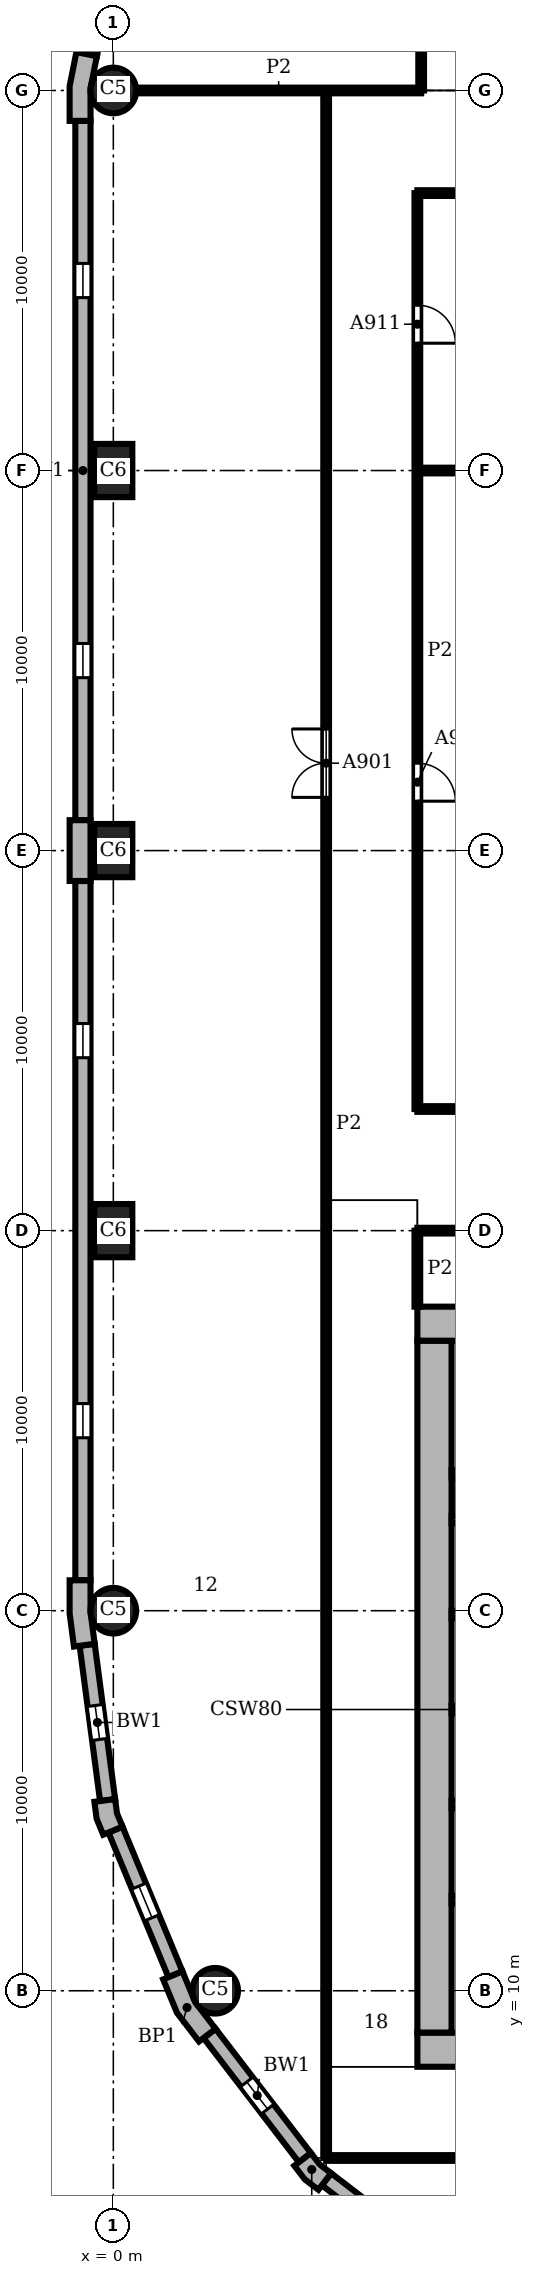
"""IFC4 building model, lengths in metres.
Left out: names, types, materials, properties, quantities, classifications, styles, units other than length and angle.
Written with IfcOpenShell. Run it as: python <this file> out.ifc"""

import sys

from ifc_helpers import new_model, si_unit, direction, frame, frame_2d, origin, origin_2d, place, context, subcontext, project, spatial, polyline, rectangle, circle, outline, extrude, element, fill, save


model = new_model("IFC4")
c1 = context("Model", 3, precision=1e-05, world=origin(), true_north=direction((0.0, 1.0)))
c2 = subcontext(c1, "Body", "Model", "MODEL_VIEW")
j1 = project(units=[si_unit("LENGTHUNIT", "METRE"), si_unit("PLANEANGLEUNIT", "RADIAN")], contexts=[c1])
p1 = place(None, origin())
s1 = spatial("IfcSite", under=j1, at=p1, CompositionType="ELEMENT")
p2 = place(p1, origin())
s2 = spatial("IfcBuilding", under=s1, at=p2, CompositionType="ELEMENT")
p3 = place(p2, frame((0.0, 0.0, 105.6)))
s3 = spatial("IfcBuildingStorey", under=s2, at=p3, CompositionType="ELEMENT", Elevation=105.6)
p4 = place(p3, frame((0.0, 60.0, 0.0), z_axis=(0.0, 0.0, 1.0), x_axis=(1.0, 0.0, 0.0)))
e1 = element("IfcColumn", 1, at=p4, inside=s3, PredefinedType="COLUMN", context=c2, shape_type="SweptSolid", body=[
    extrude(circle(Radius=0.6, at=origin_2d()), origin(), (0.0, 0.0, 1.0), 3.9),
])
for number, where, z_axis, x_axis in (
    (2, (0.0, 50.0, 0.0), (0.0, 0.0, 1.0), (0.0, 1.0, 0.0)),
    (3, (0.0, 40.0, 0.0), (0.0, 0.0, 1.0), (0.0, 1.0, 0.0)),
    (4, (0.0, 30.0, 0.0), (0.0, 0.0, 1.0), (0.0, 1.0, 0.0)),
):
    element("IfcColumn", number, at=place(p3, frame(where, z_axis=z_axis, x_axis=x_axis)), inside=s3, PredefinedType="COLUMN", context=c2, shape_type="SweptSolid", body=[
        extrude(rectangle(XDim=1.4, YDim=1.0, at=origin_2d()), origin(), (0.0, 0.0, 1.0), 3.9),
    ])
for number, where, z_axis, x_axis in (
    (5, (0.0, 20.0, 0.0), (0.0, 0.0, 1.0), (1.0, 0.0, 0.0)),
    (6, (2.679, 10.0, 0.0), (0.0, 0.0, 1.0), (1.0, 0.0, 0.0)),
):
    element("IfcColumn", number, at=place(p3, frame(where, z_axis=z_axis, x_axis=x_axis)), inside=s3, PredefinedType="COLUMN", context=c2, shape_type="SweptSolid", body=[
        extrude(circle(Radius=0.6, at=origin_2d()), origin(), (0.0, 0.0, 1.0), 3.9),
    ])
for number, where, z_axis, x_axis in (
    (7, (8.0, 8.45, 0.0), (0.0, 0.0, 1.0), (1.0, 0.0, 0.0)),
    (8, (28.0, 27.55, 0.0), (0.0, 0.0, 1.0), (-1.0, 0.0, 0.0)),
):
    element("IfcWall", number, at=place(p3, frame(where, z_axis=z_axis, x_axis=x_axis)), inside=s3, PredefinedType="SHEAR", context=c2, shape_type="SweptSolid", body=[
        extrude(rectangle(XDim=20.0, YDim=0.9, at=frame_2d((10.0, 0.0))), origin(), (0.0, 0.0, 1.0), 3.9),
    ])
p5 = place(p3, frame((8.45, 27.1, 0.0), z_axis=(0.0, 0.0, 1.0), x_axis=(0.0, -1.0, 0.0)))
e9 = element("IfcWall", 9, at=p5, inside=s3, PredefinedType="SHEAR", context=c2, shape_type="SweptSolid", body=[
    extrude(rectangle(XDim=18.2, YDim=0.9, at=frame_2d((9.1, 0.0))), origin(), (0.0, 0.0, 1.0), 3.9),
])
p6 = place(p3, origin())
e10 = element("IfcWall", 10, at=p6, inside=s3, PredefinedType="SOLIDWALL", context=c2, shape_type="SweptSolid", body=[
    extrude(outline(polyline([(-0.825, 60.98), (-0.972, 61.009), (-1.15, 60.113), (-1.15, 59.2), (-1.0, 59.2), (-0.6, 59.2), (-0.6, 60.059), (-0.432, 60.902), (-0.825, 60.98)])), origin(), (0.0, 0.0, 1.0), 3.9),
])
e11 = element("IfcWall", 11, at=p6, inside=s3, PredefinedType="SOLIDWALL", context=c2, shape_type="SweptSolid", body=[
    extrude(outline(polyline([(-1.0, 40.8), (-1.15, 40.8), (-1.15, 40.0), (-1.15, 39.2), (-1.0, 39.2), (-0.6, 39.2), (-0.6, 40.0), (-0.6, 40.8), (-1.0, 40.8)])), origin(), (0.0, 0.0, 1.0), 3.9),
])
e12 = element("IfcWall", 12, at=p6, inside=s3, PredefinedType="SOLIDWALL", context=c2, shape_type="SweptSolid", body=[
    extrude(outline(polyline([(-1.0, 20.8), (-1.15, 20.8), (-1.15, 19.925), (-1.036, 19.057), (-0.887, 19.076), (-0.49, 19.128), (-0.6, 19.961), (-0.6, 20.8), (-1.0, 20.8)])), origin(), (0.0, 0.0, 1.0), 3.9),
])
e13 = element("IfcWall", 13, at=p6, inside=s3, PredefinedType="SOLIDWALL", context=c2, shape_type="SweptSolid", body=[
    extrude(outline(polyline([(-0.349, 14.99), (-0.498, 14.971), (-0.439, 14.523), (-0.266, 14.106), (-0.128, 14.164), (0.242, 14.317), (0.097, 14.667), (0.047, 15.043), (-0.349, 14.99)])), origin(), (0.0, 0.0, 1.0), 3.9),
])
e14 = element("IfcWall", 14, at=p6, inside=s3, PredefinedType="SOLIDWALL", context=c2, shape_type="SweptSolid", body=[
    extrude(outline(polyline([(1.449, 10.356), (1.311, 10.299), (1.675, 9.42), (2.254, 8.665), (2.373, 8.757), (2.69, 9.0), (2.155, 9.698), (1.819, 10.51), (1.449, 10.356)])), origin(), (0.0, 0.0, 1.0), 3.9),
])
e15 = element("IfcWall", 15, at=p6, inside=s3, PredefinedType="SOLIDWALL", context=c2, shape_type="SweptSolid", body=[
    extrude(outline(polyline([(4.882, 5.487), (4.763, 5.396), (5.038, 5.038), (5.396, 4.763), (5.487, 4.882), (5.731, 5.199), (5.43, 5.43), (5.199, 5.731), (4.882, 5.487)])), origin(), (0.0, 0.0, 1.0), 3.9),
])
p7 = place(p3, frame((0.299, 65.602, 0.0), z_axis=(0.0, 0.0, 1.0), x_axis=(-0.195098533057, -0.98078364709, 0.0)))
e16 = element("IfcWall", 16, at=p7, inside=s3, PredefinedType="SOLIDWALL", context=c2, shape_type="SweptSolid", body=[
    extrude(rectangle(XDim=4.753, YDim=0.4, at=frame_2d((2.376, 0.0))), origin(), (0.0, 0.0, 1.0), 3.9),
])
p8 = place(p7, frame((0.226, 0.0, 0.9)))
e17 = element("IfcOpeningElement", 17, at=p8, cuts=e16, PredefinedType="OPENING", context=c2, shape_type="SweptSolid", body=[
    extrude(rectangle(XDim=4.3, YDim=2.35, at=frame_2d((2.15, 1.175))), frame((0.0, 0.21, 0.0), z_axis=(0.0, -1.0, 0.0), x_axis=(1.0, 0.0, 0.0)), (0.0, 0.0, 1.0), 0.42),
])
p9 = place(p3, frame((-0.8, 59.2, 0.0), z_axis=(0.0, 0.0, 1.0), x_axis=(0.0, -1.0, 0.0)))
e18 = element("IfcWall", 18, at=p9, inside=s3, PredefinedType="SOLIDWALL", context=c2, shape_type="SweptSolid", body=[
    extrude(rectangle(XDim=18.4, YDim=0.4, at=frame_2d((9.2, 0.0))), origin(), (0.0, 0.0, 1.0), 3.9),
])
p10 = place(p9, frame((3.75, 0.0, 0.9)))
e19 = element("IfcOpeningElement", 19, at=p10, cuts=e18, PredefinedType="OPENING", context=c2, shape_type="SweptSolid", body=[
    extrude(rectangle(XDim=0.9, YDim=2.35, at=frame_2d((0.45, 1.175))), frame((0.0, 0.21, 0.0), z_axis=(0.0, -1.0, 0.0), x_axis=(1.0, 0.0, 0.0)), (0.0, 0.0, 1.0), 0.42),
])
p11 = place(p9, frame((13.75, 0.0, 0.9)))
e20 = element("IfcOpeningElement", 20, at=p11, cuts=e18, PredefinedType="OPENING", context=c2, shape_type="SweptSolid", body=[
    extrude(rectangle(XDim=0.9, YDim=2.35, at=frame_2d((0.45, 1.175))), frame((0.0, 0.21, 0.0), z_axis=(0.0, -1.0, 0.0), x_axis=(1.0, 0.0, 0.0)), (0.0, 0.0, 1.0), 0.42),
])
p12 = place(p3, frame((-0.8, 39.2, 0.0), z_axis=(0.0, 0.0, 1.0), x_axis=(0.0, -1.0, 0.0)))
e21 = element("IfcWall", 21, at=p12, inside=s3, PredefinedType="SOLIDWALL", context=c2, shape_type="SweptSolid", body=[
    extrude(rectangle(XDim=18.4, YDim=0.4, at=frame_2d((9.2, 0.0))), origin(), (0.0, 0.0, 1.0), 3.9),
])
p13 = place(p12, frame((3.75, 0.0, 0.9)))
e22 = element("IfcOpeningElement", 22, at=p13, cuts=e21, PredefinedType="OPENING", context=c2, shape_type="SweptSolid", body=[
    extrude(rectangle(XDim=0.9, YDim=2.35, at=frame_2d((0.45, 1.175))), frame((0.0, 0.21, 0.0), z_axis=(0.0, -1.0, 0.0), x_axis=(1.0, 0.0, 0.0)), (0.0, 0.0, 1.0), 0.42),
])
p14 = place(p12, frame((13.75, 0.0, 0.9)))
e23 = element("IfcOpeningElement", 23, at=p14, cuts=e21, PredefinedType="OPENING", context=c2, shape_type="SweptSolid", body=[
    extrude(rectangle(XDim=0.9, YDim=2.35, at=frame_2d((0.45, 1.175))), frame((0.0, 0.21, 0.0), z_axis=(0.0, -1.0, 0.0), x_axis=(1.0, 0.0, 0.0)), (0.0, 0.0, 1.0), 0.42),
])
p15 = place(p3, frame((-0.689, 19.102, 0.0), z_axis=(0.0, 0.0, 1.0), x_axis=(0.130514280502, -0.991446429508, 0.0)))
e24 = element("IfcWall", 24, at=p15, inside=s3, PredefinedType="SOLIDWALL", context=c2, shape_type="SweptSolid", body=[
    extrude(rectangle(XDim=4.121, YDim=0.4, at=frame_2d((2.061, 0.0))), origin(), (0.0, 0.0, 1.0), 3.9),
])
p16 = place(p15, frame((1.611, 0.0, 0.9)))
e25 = element("IfcOpeningElement", 25, at=p16, cuts=e24, PredefinedType="OPENING", context=c2, shape_type="SweptSolid", body=[
    extrude(rectangle(XDim=0.9, YDim=2.35, at=frame_2d((0.45, 1.175))), frame((0.0, 0.21, 0.0), z_axis=(0.0, -1.0, 0.0), x_axis=(1.0, 0.0, 0.0)), (0.0, 0.0, 1.0), 0.42),
])
p17 = place(p3, frame((0.057, 14.24, 0.0), z_axis=(0.0, 0.0, 1.0), x_axis=(0.382721546029, -0.923863744394, 0.0)))
e26 = element("IfcWall", 26, at=p17, inside=s3, PredefinedType="SOLIDWALL", context=c2, shape_type="SweptSolid", body=[
    extrude(rectangle(XDim=4.121, YDim=0.4, at=frame_2d((2.061, 0.0))), origin(), (0.0, 0.0, 1.0), 3.9),
])
p18 = place(p17, frame((1.611, 0.0, 0.9)))
e27 = element("IfcOpeningElement", 27, at=p18, cuts=e26, PredefinedType="OPENING", context=c2, shape_type="SweptSolid", body=[
    extrude(rectangle(XDim=0.9, YDim=2.35, at=frame_2d((0.45, 1.175))), frame((0.0, 0.21, 0.0), z_axis=(0.0, -1.0, 0.0), x_axis=(1.0, 0.0, 0.0)), (0.0, 0.0, 1.0), 0.42),
])
p19 = place(p3, frame((2.532, 8.878, 0.0), z_axis=(0.0, 0.0, 1.0), x_axis=(0.608759824817, -0.793354571229, 0.0)))
e28 = element("IfcWall", 28, at=p19, inside=s3, PredefinedType="SOLIDWALL", context=c2, shape_type="SweptSolid", body=[
    extrude(rectangle(XDim=4.121, YDim=0.4, at=frame_2d((2.061, 0.0))), origin(), (0.0, 0.0, 1.0), 3.9),
])
p20 = place(p19, frame((1.611, 0.0, 0.9)))
e29 = element("IfcOpeningElement", 29, at=p20, cuts=e28, PredefinedType="OPENING", context=c2, shape_type="SweptSolid", body=[
    extrude(rectangle(XDim=0.9, YDim=2.35, at=frame_2d((0.45, 1.175))), frame((0.0, 0.21, 0.0), z_axis=(0.0, -1.0, 0.0), x_axis=(1.0, 0.0, 0.0)), (0.0, 0.0, 1.0), 0.42),
])
p21 = place(p3, frame((5.609, 5.041, 0.0), z_axis=(0.0, 0.0, 1.0), x_axis=(0.793354571229, -0.608759824817, 0.0)))
e30 = element("IfcWall", 30, at=p21, inside=s3, PredefinedType="SOLIDWALL", context=c2, shape_type="SweptSolid", body=[
    extrude(rectangle(XDim=4.121, YDim=0.4, at=frame_2d((2.061, 0.0))), origin(), (0.0, 0.0, 1.0), 3.9),
])
p22 = place(p21, frame((1.611, 0.0, 0.9)))
e31 = element("IfcOpeningElement", 31, at=p22, cuts=e30, PredefinedType="OPENING", context=c2, shape_type="SweptSolid", body=[
    extrude(rectangle(XDim=0.9, YDim=2.35, at=frame_2d((0.45, 1.175))), frame((0.0, 0.21, 0.0), z_axis=(0.0, -1.0, 0.0), x_axis=(1.0, 0.0, 0.0)), (0.0, 0.0, 1.0), 0.42),
])
p23 = place(p3, frame((8.9, 12.4, 0.0), z_axis=(0.0, 0.0, 1.0), x_axis=(1.0, 0.0, 0.0)))
e32 = element("IfcWall", 32, at=p23, inside=s3, PredefinedType="SHEAR", context=c2, shape_type="SweptSolid", body=[
    extrude(rectangle(XDim=4.9, YDim=0.2, at=frame_2d((2.45, 0.0))), origin(), (0.0, 0.0, 1.0), 3.58),
])
for number, where, z_axis, x_axis in (
    (33, (8.9, 14.9, 0.0), (0.0, 0.0, 1.0), (1.0, 0.0, 0.0)),
    (34, (8.9, 17.4, 0.0), (0.0, 0.0, 1.0), (1.0, 0.0, 0.0)),
    (35, (8.9, 19.9, 0.0), (0.0, 0.0, 1.0), (1.0, 0.0, 0.0)),
    (36, (8.9, 22.4, 0.0), (0.0, 0.0, 1.0), (1.0, 0.0, 0.0)),
):
    element("IfcWall", number, at=place(p3, frame(where, z_axis=z_axis, x_axis=x_axis)), inside=s3, PredefinedType="SHEAR", context=c2, shape_type="SweptSolid", body=[
        extrude(rectangle(XDim=2.8, YDim=0.2, at=frame_2d((1.4, 0.0))), origin(), (0.0, 0.0, 1.0), 3.58),
    ])
p24 = place(p3, frame((8.9, 23.6, 0.0), z_axis=(0.0, 0.0, 1.0), x_axis=(1.0, 0.0, 0.0)))
e37 = element("IfcWall", 37, at=p24, inside=s3, PredefinedType="SHEAR", context=c2, shape_type="SweptSolid", body=[
    extrude(rectangle(XDim=4.9, YDim=0.2, at=frame_2d((2.45, 0.0))), origin(), (0.0, 0.0, 1.0), 3.58),
])
p25 = place(p3, frame((5.6, 5.6, 0.0), z_axis=(0.0, 0.0, 1.0), x_axis=(0.0, 1.0, 0.0)))
e38 = element("IfcWall", 38, at=p25, inside=s3, PredefinedType="PARTITIONING", context=c2, shape_type="SweptSolid", body=[
    extrude(rectangle(XDim=54.4, YDim=0.15, at=frame_2d((27.2, 0.0))), origin(), (0.0, 0.0, 1.0), 3.58),
])
p26 = place(p25, frame((35.8, 0.0, 0.0)))
e39 = element("IfcOpeningElement", 39, at=p26, cuts=e38, PredefinedType="OPENING", context=c2, shape_type="SweptSolid", body=[
    extrude(rectangle(XDim=1.8, YDim=2.1, at=frame_2d((0.9, 1.05))), frame((0.0, 0.085, 0.0), z_axis=(0.0, -1.0, 0.0), x_axis=(1.0, 0.0, 0.0)), (0.0, 0.0, 1.0), 0.17),
])
p27 = place(p3, frame((8.0, 28.0, 0.0), z_axis=(0.0, 0.0, 1.0), x_axis=(0.0, 1.0, 0.0)))
e40 = element("IfcWall", 40, at=p27, inside=s3, PredefinedType="PARTITIONING", context=c2, shape_type="SweptSolid", body=[
    extrude(rectangle(XDim=2.0, YDim=0.15, at=frame_2d((1.0, 0.0))), origin(), (0.0, 0.0, 1.0), 3.58),
])
p28 = place(p3, frame((8.0, 33.2, 0.0), z_axis=(0.0, 0.0, 1.0), x_axis=(0.0, 1.0, 0.0)))
e41 = element("IfcWall", 41, at=p28, inside=s3, PredefinedType="PARTITIONING", context=c2, shape_type="SweptSolid", body=[
    extrude(rectangle(XDim=24.1, YDim=0.15, at=frame_2d((12.05, 0.0))), origin(), (0.0, 0.0, 1.0), 3.58),
])
p29 = place(p28, frame((8.1, 0.0, 0.0)))
e42 = element("IfcOpeningElement", 42, at=p29, cuts=e41, PredefinedType="OPENING", context=c2, shape_type="SweptSolid", body=[
    extrude(rectangle(XDim=1.0, YDim=2.1, at=frame_2d((0.5, 1.05))), frame((0.0, 0.085, 0.0), z_axis=(0.0, -1.0, 0.0), x_axis=(1.0, 0.0, 0.0)), (0.0, 0.0, 1.0), 0.17),
])
p30 = place(p28, frame((20.15, 0.0, 0.0)))
e43 = element("IfcOpeningElement", 43, at=p30, cuts=e41, PredefinedType="OPENING", context=c2, shape_type="SweptSolid", body=[
    extrude(rectangle(XDim=1.0, YDim=2.1, at=frame_2d((0.5, 1.05))), frame((0.0, 0.085, 0.0), z_axis=(0.0, -1.0, 0.0), x_axis=(1.0, 0.0, 0.0)), (0.0, 0.0, 1.0), 0.17),
])
p31 = place(p3, frame((8.1, 60.0, 0.0), z_axis=(0.0, 0.0, 1.0), x_axis=(0.0, 1.0, 0.0)))
e44 = element("IfcWall", 44, at=p31, inside=s3, PredefinedType="PARTITIONING", context=c2, shape_type="SweptSolid", body=[
    extrude(rectangle(XDim=6.4, YDim=0.15, at=frame_2d((3.2, 0.0))), origin(), (0.0, 0.0, 1.0), 3.58),
])
p32 = place(p31, frame((3.1, 0.0, 0.0)))
e45 = element("IfcOpeningElement", 45, at=p32, cuts=e44, PredefinedType="OPENING", context=c2, shape_type="SweptSolid", body=[
    extrude(rectangle(XDim=1.0, YDim=2.1, at=frame_2d((0.5, 1.05))), frame((0.0, 0.085, 0.0), z_axis=(0.0, -1.0, 0.0), x_axis=(1.0, 0.0, 0.0)), (0.0, 0.0, 1.0), 0.17),
])
p33 = place(p3, frame((5.6, 5.6, 0.0), z_axis=(0.0, 0.0, 1.0), x_axis=(1.0, 0.0, 0.0)))
e46 = element("IfcWall", 46, at=p33, inside=s3, PredefinedType="PARTITIONING", context=c2, shape_type="SweptSolid", body=[
    extrude(rectangle(XDim=25.4, YDim=0.15, at=frame_2d((12.7, 0.0))), origin(), (0.0, 0.0, 1.0), 3.58),
])
p34 = place(p33, frame((3.6, 0.0, 0.0)))
e47 = element("IfcOpeningElement", 47, at=p34, cuts=e46, PredefinedType="OPENING", context=c2, shape_type="SweptSolid", body=[
    extrude(rectangle(XDim=1.0, YDim=2.1, at=frame_2d((0.5, 1.05))), frame((0.0, 0.085, 0.0), z_axis=(0.0, -1.0, 0.0), x_axis=(1.0, 0.0, 0.0)), (0.0, 0.0, 1.0), 0.17),
])
p35 = place(p33, frame((11.75, 0.0, 0.0)))
e48 = element("IfcOpeningElement", 48, at=p35, cuts=e46, PredefinedType="OPENING", context=c2, shape_type="SweptSolid", body=[
    extrude(rectangle(XDim=1.0, YDim=2.1, at=frame_2d((0.5, 1.05))), frame((0.0, 0.085, 0.0), z_axis=(0.0, -1.0, 0.0), x_axis=(1.0, 0.0, 0.0)), (0.0, 0.0, 1.0), 0.17),
])
p36 = place(p33, frame((20.0, 0.0, 0.0)))
e49 = element("IfcOpeningElement", 49, at=p36, cuts=e46, PredefinedType="OPENING", context=c2, shape_type="SweptSolid", body=[
    extrude(rectangle(XDim=1.0, YDim=2.1, at=frame_2d((0.5, 1.05))), frame((0.0, 0.085, 0.0), z_axis=(0.0, -1.0, 0.0), x_axis=(1.0, 0.0, 0.0)), (0.0, 0.0, 1.0), 0.17),
])
p37 = place(p3, frame((8.0, 30.0, 0.0), z_axis=(0.0, 0.0, 1.0), x_axis=(1.0, 0.0, 0.0)))
e50 = element("IfcWall", 50, at=p37, inside=s3, PredefinedType="PARTITIONING", context=c2, shape_type="SweptSolid", body=[
    extrude(rectangle(XDim=1.2, YDim=0.15, at=frame_2d((0.6, 0.0))), origin(), (0.0, 0.0, 1.0), 3.58),
])
p38 = place(p3, frame((8.0, 33.2, 0.0), z_axis=(0.0, 0.0, 1.0), x_axis=(1.0, 0.0, 0.0)))
e51 = element("IfcWall", 51, at=p38, inside=s3, PredefinedType="PARTITIONING", context=c2, shape_type="SweptSolid", body=[
    extrude(rectangle(XDim=5.8, YDim=0.15, at=frame_2d((2.9, 0.0))), origin(), (0.0, 0.0, 1.0), 3.58),
])
p39 = place(p3, frame((8.0, 50.0, 0.0), z_axis=(0.0, 0.0, 1.0), x_axis=(1.0, 0.0, 0.0)))
e52 = element("IfcWall", 52, at=p39, inside=s3, PredefinedType="PARTITIONING", context=c2, shape_type="SweptSolid", body=[
    extrude(rectangle(XDim=1.2, YDim=0.15, at=frame_2d((0.6, 0.0))), origin(), (0.0, 0.0, 1.0), 3.58),
])
p40 = place(p3, frame((8.0, 57.3, 0.0), z_axis=(0.0, 0.0, 1.0), x_axis=(1.0, 0.0, 0.0)))
e53 = element("IfcWall", 53, at=p40, inside=s3, PredefinedType="PARTITIONING", context=c2, shape_type="SweptSolid", body=[
    extrude(rectangle(XDim=5.8, YDim=0.15, at=frame_2d((2.9, 0.0))), origin(), (0.0, 0.0, 1.0), 3.58),
])
p41 = place(p3, frame((0.6, 60.0, 0.0), z_axis=(0.0, 0.0, 1.0), x_axis=(1.0, 0.0, 0.0)))
e54 = element("IfcWall", 54, at=p41, inside=s3, PredefinedType="PARTITIONING", context=c2, shape_type="SweptSolid", body=[
    extrude(rectangle(XDim=7.5, YDim=0.15, at=frame_2d((3.75, 0.0))), origin(), (0.0, 0.0, 1.0), 3.58),
])
p42 = place(p10, origin())
e55 = element("IfcWindow", 55, at=p42, inside=s3, PartitioningType="SINGLE_PANEL", PredefinedType="WINDOW", context=c2, shape_type="SweptSolid", body=[
    extrude(rectangle(XDim=0.9, YDim=2.35, at=frame_2d((0.45, 1.175))), frame((0.0, 0.16, 0.0), z_axis=(0.0, -1.0, 0.0), x_axis=(1.0, 0.0, 0.0)), (0.0, 0.0, 1.0), 0.06),
])
fill(e19, e55)
p43 = place(p11, origin())
e56 = element("IfcWindow", 56, at=p43, inside=s3, PartitioningType="SINGLE_PANEL", PredefinedType="WINDOW", context=c2, shape_type="SweptSolid", body=[
    extrude(rectangle(XDim=0.9, YDim=2.35, at=frame_2d((0.45, 1.175))), frame((0.0, 0.16, 0.0), z_axis=(0.0, -1.0, 0.0), x_axis=(1.0, 0.0, 0.0)), (0.0, 0.0, 1.0), 0.06),
])
fill(e20, e56)
p44 = place(p13, origin())
e57 = element("IfcWindow", 57, at=p44, inside=s3, PartitioningType="SINGLE_PANEL", PredefinedType="WINDOW", context=c2, shape_type="SweptSolid", body=[
    extrude(rectangle(XDim=0.9, YDim=2.35, at=frame_2d((0.45, 1.175))), frame((0.0, 0.16, 0.0), z_axis=(0.0, -1.0, 0.0), x_axis=(1.0, 0.0, 0.0)), (0.0, 0.0, 1.0), 0.06),
])
fill(e22, e57)
p45 = place(p14, origin())
e58 = element("IfcWindow", 58, at=p45, inside=s3, PartitioningType="SINGLE_PANEL", PredefinedType="WINDOW", context=c2, shape_type="SweptSolid", body=[
    extrude(rectangle(XDim=0.9, YDim=2.35, at=frame_2d((0.45, 1.175))), frame((0.0, 0.16, 0.0), z_axis=(0.0, -1.0, 0.0), x_axis=(1.0, 0.0, 0.0)), (0.0, 0.0, 1.0), 0.06),
])
fill(e23, e58)
p46 = place(p16, origin())
e59 = element("IfcWindow", 59, at=p46, inside=s3, PartitioningType="SINGLE_PANEL", PredefinedType="WINDOW", context=c2, shape_type="SweptSolid", body=[
    extrude(rectangle(XDim=0.9, YDim=2.35, at=frame_2d((0.45, 1.175))), frame((0.0, 0.16, 0.0), z_axis=(0.0, -1.0, 0.0), x_axis=(1.0, 0.0, 0.0)), (0.0, 0.0, 1.0), 0.06),
])
fill(e25, e59)
p47 = place(p18, origin())
e60 = element("IfcWindow", 60, at=p47, inside=s3, PartitioningType="SINGLE_PANEL", PredefinedType="WINDOW", context=c2, shape_type="SweptSolid", body=[
    extrude(rectangle(XDim=0.9, YDim=2.35, at=frame_2d((0.45, 1.175))), frame((0.0, 0.16, 0.0), z_axis=(0.0, -1.0, 0.0), x_axis=(1.0, 0.0, 0.0)), (0.0, 0.0, 1.0), 0.06),
])
fill(e27, e60)
p48 = place(p20, origin())
e61 = element("IfcWindow", 61, at=p48, inside=s3, PartitioningType="SINGLE_PANEL", PredefinedType="WINDOW", context=c2, shape_type="SweptSolid", body=[
    extrude(rectangle(XDim=0.9, YDim=2.35, at=frame_2d((0.45, 1.175))), frame((0.0, 0.16, 0.0), z_axis=(0.0, -1.0, 0.0), x_axis=(1.0, 0.0, 0.0)), (0.0, 0.0, 1.0), 0.06),
])
fill(e29, e61)
p49 = place(p26, origin())
e62 = element("IfcDoor", 62, at=p49, inside=s3, OperationType="DOUBLE_DOOR_SINGLE_SWING", PredefinedType="DOOR", context=c2, shape_type="SweptSolid", body=[
    extrude(rectangle(XDim=1.8, YDim=2.1, at=frame_2d((0.9, 1.05))), frame((0.0, 0.025, 0.0), z_axis=(0.0, -1.0, 0.0), x_axis=(1.0, 0.0, 0.0)), (0.0, 0.0, 1.0), 0.05),
])
fill(e39, e62)
p50 = place(p29, frame((1.0, 0.0, 0.0), z_axis=(0.0, 0.0, 1.0), x_axis=(-1.0, 0.0, 0.0)))
e63 = element("IfcDoor", 63, at=p50, inside=s3, OperationType="SINGLE_SWING_RIGHT", PredefinedType="DOOR", context=c2, shape_type="SweptSolid", body=[
    extrude(rectangle(XDim=1.0, YDim=2.1, at=frame_2d((0.5, 1.05))), frame((0.0, 0.025, 0.0), z_axis=(0.0, -1.0, 0.0), x_axis=(1.0, 0.0, 0.0)), (0.0, 0.0, 1.0), 0.05),
])
fill(e42, e63)
p51 = place(p30, frame((1.0, 0.0, 0.0), z_axis=(0.0, 0.0, 1.0), x_axis=(-1.0, 0.0, 0.0)))
e64 = element("IfcDoor", 64, at=p51, inside=s3, OperationType="SINGLE_SWING_RIGHT", PredefinedType="DOOR", context=c2, shape_type="SweptSolid", body=[
    extrude(rectangle(XDim=1.0, YDim=2.1, at=frame_2d((0.5, 1.05))), frame((0.0, 0.025, 0.0), z_axis=(0.0, -1.0, 0.0), x_axis=(1.0, 0.0, 0.0)), (0.0, 0.0, 1.0), 0.05),
])
fill(e43, e64)
save(model, sys.argv[1])
